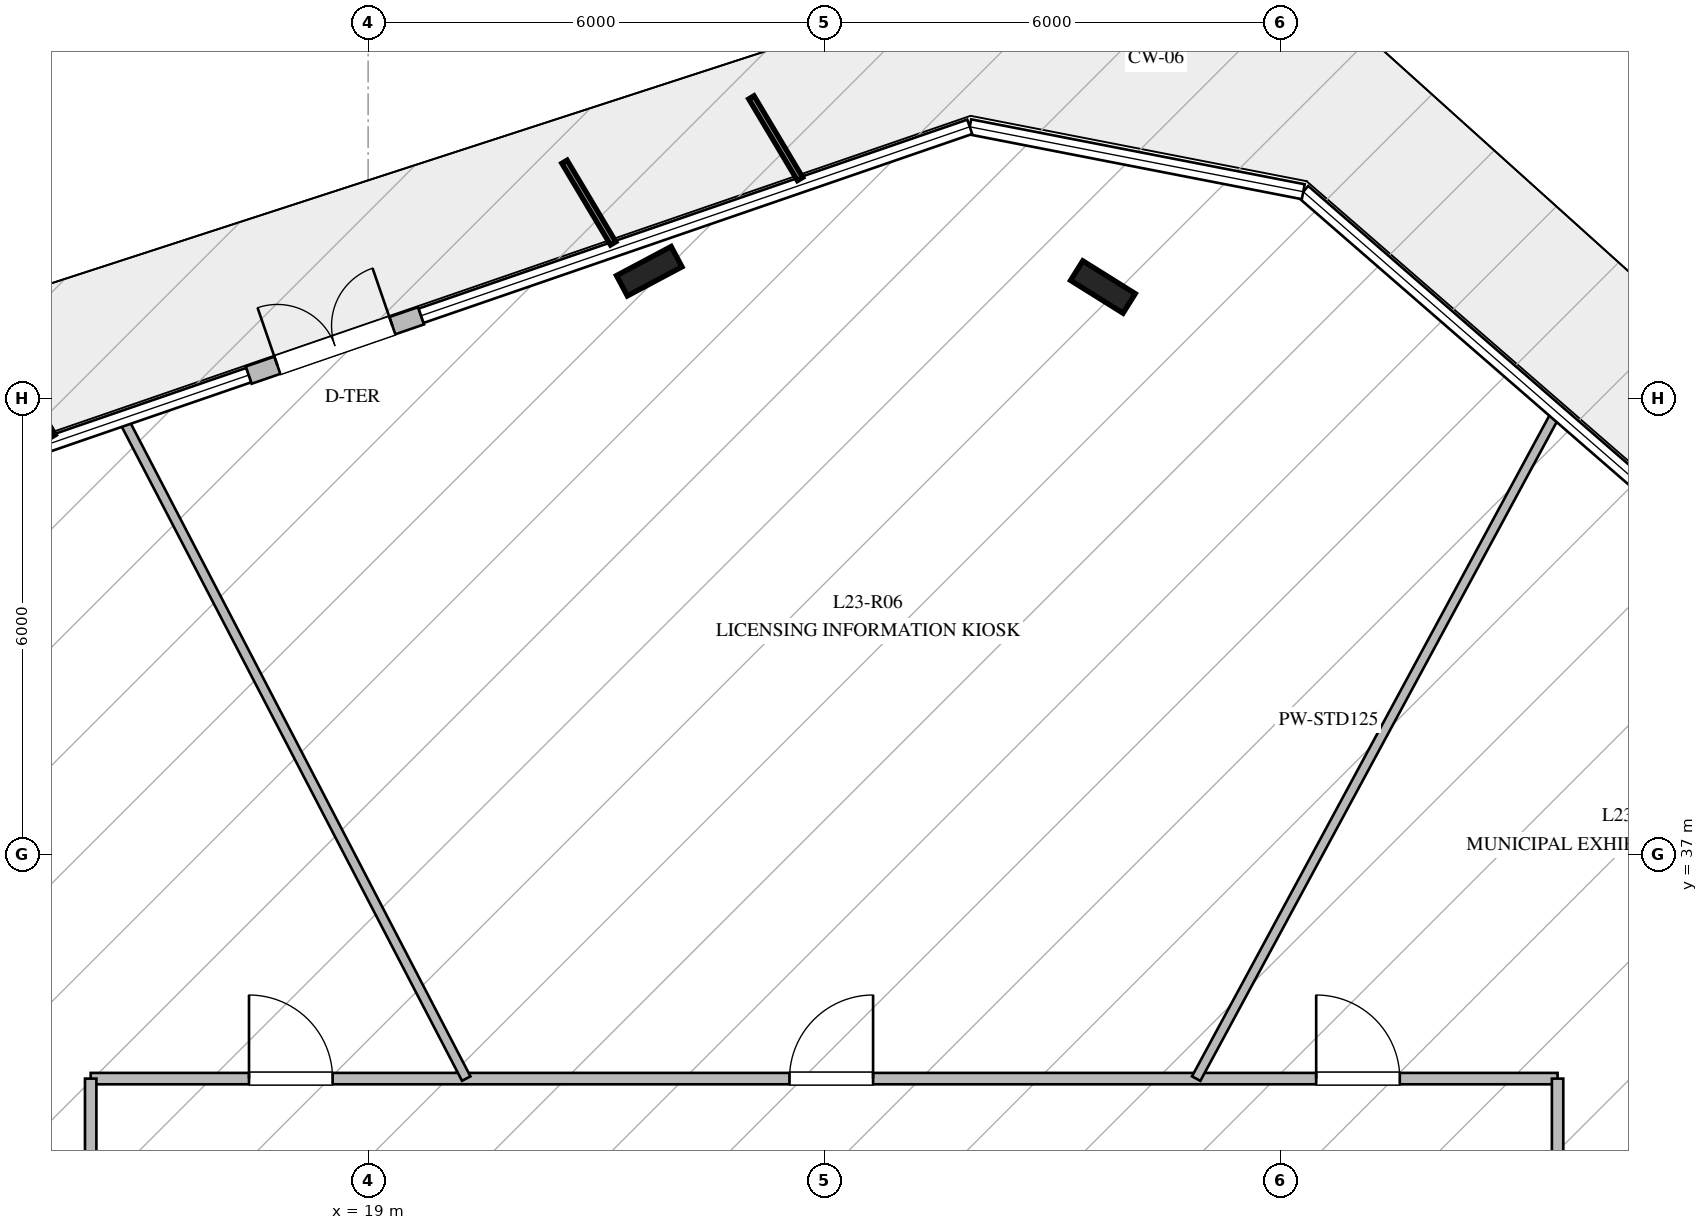
"""IFC4 building model, lengths in metres.
Left out: names, types, materials, properties, quantities, classifications, styles, units other than length and angle.
Written with IfcOpenShell. Run it as: python <this file> out.ifc"""

import sys

from ifc_helpers import new_model, si_unit, direction, frame, frame_2d, origin, origin_2d, place, context, subcontext, project, spatial, rectangle, i_section, extrude, element, fill, save


model = new_model("IFC4")
c1 = context("Model", 3, precision=1e-05, world=origin(), true_north=direction((0.0, 1.0)))
c2 = subcontext(c1, "Body", "Model", "MODEL_VIEW")
j1 = project(units=[si_unit("LENGTHUNIT", "METRE"), si_unit("PLANEANGLEUNIT", "RADIAN")], contexts=[c1])
p1 = place(None, origin())
s1 = spatial("IfcSite", under=j1, at=p1, CompositionType="ELEMENT")
p2 = place(p1, origin())
s2 = spatial("IfcBuilding", under=s1, at=p2, CompositionType="ELEMENT")
p3 = place(p2, frame((0.0, 0.0, 97.4)))
s3 = spatial("IfcBuildingStorey", under=s2, at=p3, CompositionType="ELEMENT", Elevation=97.4)
for number, where, z_axis, x_axis in (
    (1, (28.668, 44.464, -0.27), (0.0, 0.0, 1.0), (-0.848, 0.53, 0.0)),
    (2, (22.699, 44.672, -0.27), (0.0, 0.0, 1.0), (0.883, 0.469, 0.0)),
):
    element("IfcColumn", number, at=place(p3, frame(where, z_axis=z_axis, x_axis=x_axis)), inside=s3, PredefinedType="COLUMN", context=c2, shape_type="SweptSolid", body=[
        extrude(i_section(OverallWidth=0.303, OverallDepth=0.814, WebThickness=0.021, FlangeThickness=0.04, at=origin_2d()), origin(), (0.0, 0.0, 1.0), 5.27),
    ])
p4 = place(p3, frame((19.697, 44.086, 0.0), z_axis=(0.0, 0.0, 1.0), x_axis=(-0.945555551181, -0.325460749755, 0.0)))
e3 = element("IfcWall", 3, at=p4, inside=s3, PredefinedType="STANDARD", context=c2, shape_type="SweptSolid", body=[
    extrude(rectangle(XDim=2.4, YDim=0.24, at=frame_2d((1.2, 0.0))), origin(), (0.0, 0.0, 1.0), 4.76),
])
p5 = place(p4, frame((0.4, 0.0, 0.0)))
e4 = element("IfcOpeningElement", 4, at=p5, cuts=e3, PredefinedType="OPENING", context=c2, shape_type="SweptSolid", body=[
    extrude(rectangle(XDim=1.6, YDim=2.25, at=frame_2d((0.8, 1.125))), frame((0.0, 0.13, 0.0), z_axis=(0.0, -1.0, 0.0), x_axis=(1.0, 0.0, 0.0)), (0.0, 0.0, 1.0), 0.26),
])
p6 = place(p3, frame((15.35, 34.05, 0.0), z_axis=(0.0, 0.0, 1.0), x_axis=(1.0, 0.0, 0.0)))
e5 = element("IfcWall", 5, at=p6, inside=s3, PredefinedType="PARTITIONING", context=c2, shape_type="SweptSolid", body=[
    extrude(rectangle(XDim=19.3, YDim=0.15, at=frame_2d((9.65, 0.0))), origin(), (0.0, 0.0, 1.0), 4.21),
])
p7 = place(p6, frame((16.124, 0.0, 0.0)))
e6 = element("IfcOpeningElement", 6, at=p7, cuts=e5, PredefinedType="OPENING", context=c2, shape_type="SweptSolid", body=[
    extrude(rectangle(XDim=1.1, YDim=2.2, at=frame_2d((0.55, 1.1))), frame((0.0, 0.085, 0.0), z_axis=(0.0, -1.0, 0.0), x_axis=(1.0, 0.0, 0.0)), (0.0, 0.0, 1.0), 0.17),
])
p8 = place(p6, frame((9.194, 0.0, 0.0)))
e7 = element("IfcOpeningElement", 7, at=p8, cuts=e5, PredefinedType="OPENING", context=c2, shape_type="SweptSolid", body=[
    extrude(rectangle(XDim=1.1, YDim=2.2, at=frame_2d((0.55, 1.1))), frame((0.0, 0.085, 0.0), z_axis=(0.0, -1.0, 0.0), x_axis=(1.0, 0.0, 0.0)), (0.0, 0.0, 1.0), 0.17),
])
p9 = place(p6, frame((2.083, 0.0, 0.0)))
e8 = element("IfcOpeningElement", 8, at=p9, cuts=e5, PredefinedType="OPENING", context=c2, shape_type="SweptSolid", body=[
    extrude(rectangle(XDim=1.1, YDim=2.2, at=frame_2d((0.55, 1.1))), frame((0.0, 0.085, 0.0), z_axis=(0.0, -1.0, 0.0), x_axis=(1.0, 0.0, 0.0)), (0.0, 0.0, 1.0), 0.17),
])
p10 = place(p3, frame((34.65, 34.05, 0.0), z_axis=(0.0, 0.0, 1.0), x_axis=(0.0, -1.0, 0.0)))
e9 = element("IfcWall", 9, at=p10, inside=s3, PredefinedType="PARTITIONING", context=c2, shape_type="SweptSolid", body=[
    extrude(rectangle(XDim=18.1, YDim=0.15, at=frame_2d((9.05, 0.0))), origin(), (0.0, 0.0, 1.0), 4.21),
])
p11 = place(p10, frame((14.562, 0.0, 0.0)))
e10 = element("IfcOpeningElement", 10, at=p11, cuts=e9, PredefinedType="OPENING", context=c2, shape_type="SweptSolid", body=[
    extrude(rectangle(XDim=1.1, YDim=2.2, at=frame_2d((0.55, 1.1))), frame((0.0, 0.085, 0.0), z_axis=(0.0, -1.0, 0.0), x_axis=(1.0, 0.0, 0.0)), (0.0, 0.0, 1.0), 0.17),
])
p12 = place(p10, frame((7.872, 0.0, 0.0)))
e11 = element("IfcOpeningElement", 11, at=p12, cuts=e9, PredefinedType="OPENING", context=c2, shape_type="SweptSolid", body=[
    extrude(rectangle(XDim=1.1, YDim=2.2, at=frame_2d((0.55, 1.1))), frame((0.0, 0.085, 0.0), z_axis=(0.0, -1.0, 0.0), x_axis=(1.0, 0.0, 0.0)), (0.0, 0.0, 1.0), 0.17),
])
p13 = place(p3, frame((15.35, 15.95, 0.0), z_axis=(0.0, 0.0, 1.0), x_axis=(0.0, 1.0, 0.0)))
e12 = element("IfcWall", 12, at=p13, inside=s3, PredefinedType="PARTITIONING", context=c2, shape_type="SweptSolid", body=[
    extrude(rectangle(XDim=18.1, YDim=0.15, at=frame_2d((9.05, 0.0))), origin(), (0.0, 0.0, 1.0), 4.21),
])
p14 = place(p13, frame((5.012, 0.0, 0.0)))
e13 = element("IfcOpeningElement", 13, at=p14, cuts=e12, PredefinedType="OPENING", context=c2, shape_type="SweptSolid", body=[
    extrude(rectangle(XDim=1.1, YDim=2.2, at=frame_2d((0.55, 1.1))), frame((0.0, 0.085, 0.0), z_axis=(0.0, -1.0, 0.0), x_axis=(1.0, 0.0, 0.0)), (0.0, 0.0, 1.0), 0.17),
])
p15 = place(p3, frame((29.895, 34.05, 0.0), z_axis=(0.0, 0.0, 1.0), x_axis=(0.475710951227, 0.87960166603, 0.0)))
e14 = element("IfcWall", 14, at=p15, inside=s3, PredefinedType="PARTITIONING", context=c2, shape_type="SweptSolid", body=[
    extrude(rectangle(XDim=9.953, YDim=0.125, at=frame_2d((4.977, 0.0))), origin(), (0.0, 0.0, 1.0), 4.02),
])
p16 = place(p3, frame((20.291, 34.05, 0.0), z_axis=(0.0, 0.0, 1.0), x_axis=(-0.461526576331, 0.887126382958, 0.0)))
e15 = element("IfcWall", 15, at=p16, inside=s3, PredefinedType="PARTITIONING", context=c2, shape_type="SweptSolid", body=[
    extrude(rectangle(XDim=9.772, YDim=0.125, at=frame_2d((4.886, 0.0))), origin(), (0.0, 0.0, 1.0), 4.05),
])
p17 = place(p3, frame((34.65, 29.485, 0.0), z_axis=(0.0, 0.0, 1.0), x_axis=(0.90687505581, 0.421399612184, 0.0)))
e16 = element("IfcWall", 16, at=p17, inside=s3, PredefinedType="PARTITIONING", context=c2, shape_type="SweptSolid", body=[
    extrude(rectangle(XDim=10.996, YDim=0.125, at=frame_2d((5.498, 0.0))), origin(), (0.0, 0.0, 1.0), 4.16),
])
p18 = place(p5, frame((1.6, 0.0, 0.0), z_axis=(0.0, 0.0, 1.0), x_axis=(-1.0, 0.0, 0.0)))
e17 = element("IfcDoor", 17, at=p18, inside=s3, OperationType="DOUBLE_DOOR_SINGLE_SWING", PredefinedType="DOOR", context=c2, shape_type="SweptSolid", body=[
    extrude(rectangle(XDim=1.6, YDim=2.25, at=frame_2d((0.8, 1.125))), frame((0.0, 0.025, 0.0), z_axis=(0.0, -1.0, 0.0), x_axis=(1.0, 0.0, 0.0)), (0.0, 0.0, 1.0), 0.05),
])
fill(e4, e17)
p19 = place(p7, origin())
e18 = element("IfcDoor", 18, at=p19, inside=s3, OperationType="SINGLE_SWING_LEFT", PredefinedType="DOOR", context=c2, shape_type="SweptSolid", body=[
    extrude(rectangle(XDim=1.1, YDim=2.2, at=frame_2d((0.55, 1.1))), frame((0.0, 0.025, 0.0), z_axis=(0.0, -1.0, 0.0), x_axis=(1.0, 0.0, 0.0)), (0.0, 0.0, 1.0), 0.05),
])
fill(e6, e18)
p20 = place(p8, origin())
e19 = element("IfcDoor", 19, at=p20, inside=s3, OperationType="SINGLE_SWING_RIGHT", PredefinedType="DOOR", context=c2, shape_type="SweptSolid", body=[
    extrude(rectangle(XDim=1.1, YDim=2.2, at=frame_2d((0.55, 1.1))), frame((0.0, 0.025, 0.0), z_axis=(0.0, -1.0, 0.0), x_axis=(1.0, 0.0, 0.0)), (0.0, 0.0, 1.0), 0.05),
])
fill(e7, e19)
p21 = place(p9, origin())
e20 = element("IfcDoor", 20, at=p21, inside=s3, OperationType="SINGLE_SWING_LEFT", PredefinedType="DOOR", context=c2, shape_type="SweptSolid", body=[
    extrude(rectangle(XDim=1.1, YDim=2.2, at=frame_2d((0.55, 1.1))), frame((0.0, 0.025, 0.0), z_axis=(0.0, -1.0, 0.0), x_axis=(1.0, 0.0, 0.0)), (0.0, 0.0, 1.0), 0.05),
])
fill(e8, e20)
save(model, sys.argv[1])
